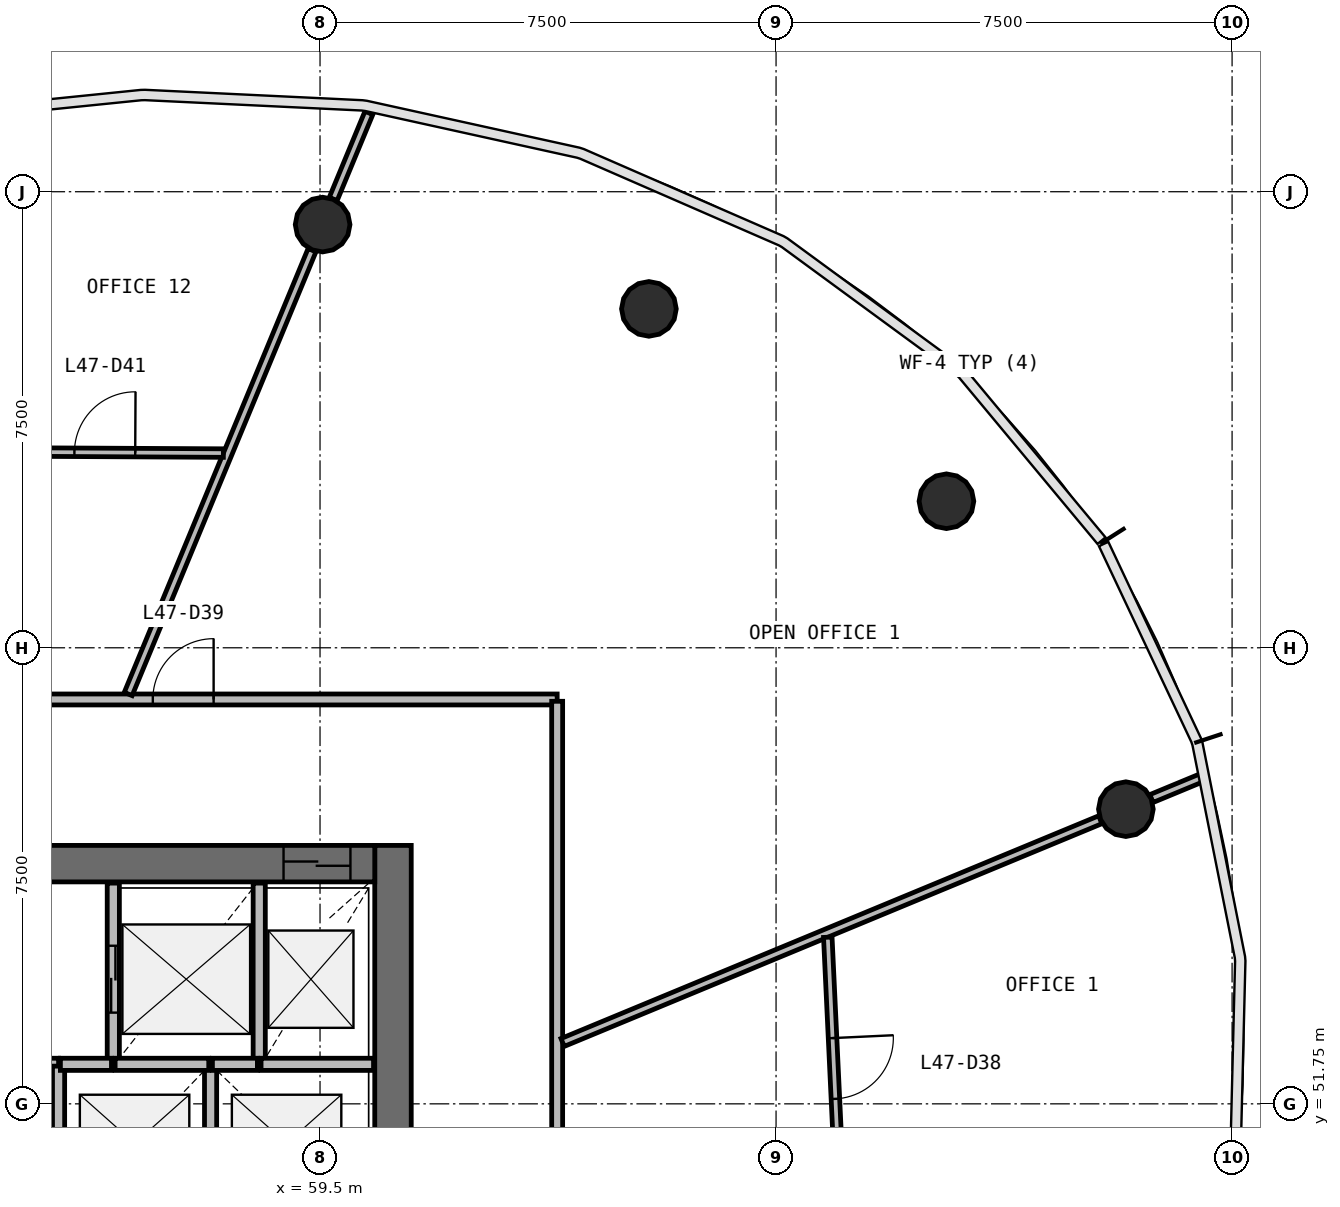
"""IFC4 building model, lengths in metres.
Left out: names, types, materials, properties, quantities, classifications, styles, units other than length and angle.
Written with IfcOpenShell. Run it as: python <this file> out.ifc"""

import sys

from ifc_helpers import new_model, si_unit, direction, frame, frame_2d, origin, origin_2d, place, context, subcontext, project, spatial, rectangle, circle, extrude, source, transform, mapped, element, fill, save


model = new_model("IFC4")
c1 = context("Model", 3, precision=1e-05, world=origin(), true_north=direction((0.0, 1.0)))
c2 = subcontext(c1, "Body", "Model", "MODEL_VIEW")
j1 = project(units=[si_unit("LENGTHUNIT", "METRE"), si_unit("PLANEANGLEUNIT", "RADIAN")], contexts=[c1])
p1 = place(None, origin())
s1 = spatial("IfcSite", under=j1, at=p1, CompositionType="ELEMENT")
p2 = place(p1, origin())
s2 = spatial("IfcBuilding", under=s1, at=p2, CompositionType="ELEMENT")
p3 = place(p2, frame((0.0, 0.0, 195.5)))
s3 = spatial("IfcBuildingStorey", under=s2, at=p3, CompositionType="ELEMENT", Elevation=195.5)
p4 = place(p3, frame((60.7, 40.0, 0.0), z_axis=(0.0, 0.0, 1.0), x_axis=(0.0, 1.0, 0.0)))
e1 = element("IfcWall", 1, at=p4, inside=s3, PredefinedType="SHEAR", context=c2, shape_type="SweptSolid", body=[
    extrude(rectangle(XDim=16.0, YDim=0.6, at=frame_2d((8.0, 0.0))), origin(), (0.0, 0.0, 1.0), 3.9),
])
p5 = place(p4, frame((7.1, 0.0, 0.0)))
e2 = element("IfcOpeningElement", 2, at=p5, cuts=e1, PredefinedType="OPENING", context=c2, shape_type="SweptSolid", body=[
    extrude(rectangle(XDim=1.8, YDim=2.1, at=frame_2d((0.9, 1.05))), frame((0.0, 0.31, 0.0), z_axis=(0.0, -1.0, 0.0), x_axis=(1.0, 0.0, 0.0)), (0.0, 0.0, 1.0), 0.62),
])
p6 = place(p3, frame((60.4, 55.7, 0.0), z_axis=(0.0, 0.0, 1.0), x_axis=(-1.0, 0.0, 0.0)))
e3 = element("IfcWall", 3, at=p6, inside=s3, PredefinedType="SHEAR", context=c2, shape_type="SweptSolid", body=[
    extrude(rectangle(XDim=16.8, YDim=0.6, at=frame_2d((8.4, 0.0))), origin(), (0.0, 0.0, 1.0), 3.9),
])
p7 = place(p6, frame((0.4, 0.0, 0.0)))
e4 = element("IfcOpeningElement", 4, at=p7, cuts=e3, PredefinedType="OPENING", context=c2, shape_type="SweptSolid", body=[
    extrude(rectangle(XDim=1.1, YDim=2.1, at=frame_2d((0.55, 1.05))), frame((0.0, 0.31, 0.0), z_axis=(0.0, -1.0, 0.0), x_axis=(1.0, 0.0, 0.0)), (0.0, 0.0, 1.0), 0.62),
])
p8 = place(p6, frame((10.3, 0.0, 0.0)))
e5 = element("IfcOpeningElement", 5, at=p8, cuts=e3, PredefinedType="OPENING", context=c2, shape_type="SweptSolid", body=[
    extrude(rectangle(XDim=1.2, YDim=2.1, at=frame_2d((0.6, 1.05))), frame((0.0, 0.31, 0.0), z_axis=(0.0, -1.0, 0.0), x_axis=(1.0, 0.0, 0.0)), (0.0, 0.0, 1.0), 0.62),
])
p9 = place(p6, frame((7.25, 0.0, 0.0)))
e6 = element("IfcOpeningElement", 6, at=p9, cuts=e3, PredefinedType="OPENING", context=c2, shape_type="SweptSolid", body=[
    extrude(rectangle(XDim=1.1, YDim=2.1, at=frame_2d((0.55, 1.05))), frame((0.0, 0.31, 0.0), z_axis=(0.0, -1.0, 0.0), x_axis=(1.0, 0.0, 0.0)), (0.0, 0.0, 1.0), 0.62),
])
m1 = source(origin(), c2, "Body", "SweptSolid", [
    extrude(circle(Radius=0.45, at=origin_2d()), origin(), (0.0, 0.0, 1.0), 3.9),
])
for number, where, z_axis, x_axis in (
    (7, (72.753, 56.596, 0.0), (0.0, 0.0, 1.0), (1.0, 0.0, 0.0)),
    (8, (69.802, 61.66, 0.0), (0.0, 0.0, 1.0), (1.0, 0.0, 0.0)),
    (9, (64.909, 64.823, 0.0), (0.0, 0.0, 1.0), (1.0, 0.0, 0.0)),
    (10, (59.543, 66.21, 0.0), (0.0, 0.0, 1.0), (1.0, 0.0, 0.0)),
):
    element("IfcColumn", number, at=place(p3, frame(where, z_axis=z_axis, x_axis=x_axis)), inside=s3, PredefinedType="COLUMN", context=c2, shape_type="MappedRepresentation", body=[
        mapped(m1, transform((0.0, 0.0, 0.0), scale=1.0)),
    ])
p10 = place(p3, frame((56.1, 55.38, 0.0), z_axis=(0.0, 0.0, 1.0), x_axis=(0.0, -1.0, 0.0)))
e11 = element("IfcWall", 11, at=p10, inside=s3, PredefinedType="SOLIDWALL", context=c2, shape_type="SweptSolid", body=[
    extrude(rectangle(XDim=2.98, YDim=0.2, at=frame_2d((1.49, 0.0))), origin(), (0.0, 0.0, 1.0), 3.58),
])
p11 = place(p10, frame((1.03, 0.0, 0.0)))
e12 = element("IfcOpeningElement", 12, at=p11, cuts=e11, PredefinedType="OPENING", context=c2, shape_type="SweptSolid", body=[
    extrude(rectangle(XDim=1.1, YDim=2.1, at=frame_2d((0.55, 1.05))), frame((0.0, 0.11, 0.0), z_axis=(0.0, -1.0, 0.0), x_axis=(1.0, 0.0, 0.0)), (0.0, 0.0, 1.0), 0.22),
])
p12 = place(p3, frame((58.5, 52.4, 0.0), z_axis=(0.0, 0.0, 1.0), x_axis=(0.0, 1.0, 0.0)))
e13 = element("IfcWall", 13, at=p12, inside=s3, PredefinedType="SOLIDWALL", context=c2, shape_type="SweptSolid", body=[
    extrude(rectangle(XDim=2.98, YDim=0.2, at=frame_2d((1.49, 0.0))), origin(), (0.0, 0.0, 1.0), 3.58),
])
p13 = place(p3, frame((55.2, 52.4, 0.0), z_axis=(0.0, 0.0, 1.0), x_axis=(-1.0, 0.0, 0.0)))
e14 = element("IfcWall", 14, at=p13, inside=s3, PredefinedType="SOLIDWALL", context=c2, shape_type="SweptSolid", body=[
    extrude(rectangle(XDim=2.5, YDim=0.2, at=frame_2d((1.25, 0.0))), origin(), (0.0, 0.0, 1.0), 3.58),
])
p14 = place(p3, frame((55.2, 50.01, 0.0), z_axis=(0.0, 0.0, 1.0), x_axis=(0.0, 1.0, 0.0)))
e15 = element("IfcWall", 15, at=p14, inside=s3, PredefinedType="SOLIDWALL", context=c2, shape_type="SweptSolid", body=[
    extrude(rectangle(XDim=2.36, YDim=0.2, at=frame_2d((1.18, 0.0))), origin(), (0.0, 0.0, 1.0), 3.58),
])
p15 = place(p3, frame((57.7, 50.01, 0.0), z_axis=(0.0, 0.0, 1.0), x_axis=(0.0, 1.0, 0.0)))
e16 = element("IfcWall", 16, at=p15, inside=s3, PredefinedType="SOLIDWALL", context=c2, shape_type="SweptSolid", body=[
    extrude(rectangle(XDim=2.39, YDim=0.2, at=frame_2d((1.195, 0.0))), origin(), (0.0, 0.0, 1.0), 3.58),
])
p16 = place(p3, frame((60.38, 52.4, 0.0), z_axis=(0.0, 0.0, 1.0), x_axis=(-1.0, 0.0, 0.0)))
e17 = element("IfcWall", 17, at=p16, inside=s3, PredefinedType="SOLIDWALL", context=c2, shape_type="SweptSolid", body=[
    extrude(rectangle(XDim=1.85, YDim=0.2, at=frame_2d((0.925, 0.0))), origin(), (0.0, 0.0, 1.0), 3.58),
])
p17 = place(p3, frame((57.67, 52.4, 0.0), z_axis=(0.0, 0.0, 1.0), x_axis=(-1.0, 0.0, 0.0)))
e18 = element("IfcWall", 18, at=p17, inside=s3, PredefinedType="SOLIDWALL", context=c2, shape_type="SweptSolid", body=[
    extrude(rectangle(XDim=1.54, YDim=0.2, at=frame_2d((0.77, 0.0))), origin(), (0.0, 0.0, 1.0), 3.58),
])
p18 = place(p3, frame((56.07, 52.4, 0.0), z_axis=(0.0, 0.0, 1.0), x_axis=(-1.0, 0.0, 0.0)))
e19 = element("IfcWall", 19, at=p18, inside=s3, PredefinedType="SOLIDWALL", context=c2, shape_type="SweptSolid", body=[
    extrude(rectangle(XDim=0.84, YDim=0.2, at=frame_2d((0.42, 0.0))), origin(), (0.0, 0.0, 1.0), 3.58),
])
p19 = place(p3, frame((58.47, 52.4, 0.0), z_axis=(0.0, 0.0, 1.0), x_axis=(-1.0, 0.0, 0.0)))
e20 = element("IfcWall", 20, at=p19, inside=s3, PredefinedType="SOLIDWALL", context=c2, shape_type="SweptSolid", body=[
    extrude(rectangle(XDim=0.74, YDim=0.2, at=frame_2d((0.37, 0.0))), origin(), (0.0, 0.0, 1.0), 3.58),
])
p20 = place(p3, frame((40.6, 58.4, 0.0), z_axis=(0.0, 0.0, 1.0), x_axis=(1.0, 0.0, 0.0)))
e21 = element("IfcWall", 21, at=p20, inside=s3, PredefinedType="PARTITIONING", context=c2, shape_type="SweptSolid", body=[
    extrude(rectangle(XDim=22.8, YDim=0.18, at=frame_2d((11.4, 0.0))), origin(), (0.0, 0.0, 1.0), 2.88),
])
p21 = place(p20, frame((16.15, 0.0, 0.0)))
e22 = element("IfcOpeningElement", 22, at=p21, cuts=e21, PredefinedType="OPENING", context=c2, shape_type="SweptSolid", body=[
    extrude(rectangle(XDim=1.0, YDim=2.1, at=frame_2d((0.5, 1.05))), frame((0.0, 0.1, 0.0), z_axis=(0.0, -1.0, 0.0), x_axis=(1.0, 0.0, 0.0)), (0.0, 0.0, 1.0), 0.2),
])
p22 = place(p20, frame((10.95, 0.0, 0.0)))
e23 = element("IfcOpeningElement", 23, at=p22, cuts=e21, PredefinedType="OPENING", context=c2, shape_type="SweptSolid", body=[
    extrude(rectangle(XDim=1.0, YDim=2.1, at=frame_2d((0.5, 1.05))), frame((0.0, 0.1, 0.0), z_axis=(0.0, -1.0, 0.0), x_axis=(1.0, 0.0, 0.0)), (0.0, 0.0, 1.0), 0.2),
])
p23 = place(p3, frame((63.4, 58.37, 0.0), z_axis=(0.0, 0.0, 1.0), x_axis=(0.0, -1.0, 0.0)))
e24 = element("IfcWall", 24, at=p23, inside=s3, PredefinedType="PARTITIONING", context=c2, shape_type="SweptSolid", body=[
    extrude(rectangle(XDim=20.74, YDim=0.18, at=frame_2d((10.37, 0.0))), origin(), (0.0, 0.0, 1.0), 2.88),
])
p24 = place(p23, frame((9.89, 0.0, 0.0)))
e25 = element("IfcOpeningElement", 25, at=p24, cuts=e24, PredefinedType="OPENING", context=c2, shape_type="SweptSolid", body=[
    extrude(rectangle(XDim=1.0, YDim=2.1, at=frame_2d((0.5, 1.05))), frame((0.0, 0.1, 0.0), z_axis=(0.0, -1.0, 0.0), x_axis=(1.0, 0.0, 0.0)), (0.0, 0.0, 1.0), 0.2),
])
p25 = place(p3, frame((72.333, 56.422, 0.0), z_axis=(0.0, 0.0, 1.0), x_axis=(-0.923877866197, -0.382687455178, 0.0)))
e26 = element("IfcWall", 26, at=p25, inside=s3, PredefinedType="PARTITIONING", context=c2, shape_type="SweptSolid", body=[
    extrude(rectangle(XDim=9.571, YDim=0.14, at=frame_2d((4.786, 0.0))), origin(), (0.0, 0.0, 1.0), 2.88),
])
p26 = place(p3, frame((59.369, 65.789, 0.0), z_axis=(0.0, 0.0, 1.0), x_axis=(-0.382679289053, -0.923881248716, 0.0)))
e27 = element("IfcWall", 27, at=p26, inside=s3, PredefinedType="PARTITIONING", context=c2, shape_type="SweptSolid", body=[
    extrude(rectangle(XDim=7.901, YDim=0.14, at=frame_2d((3.95, 0.0))), origin(), (0.0, 0.0, 1.0), 2.88),
])
p27 = place(p3, frame((67.851, 54.49, 0.0), z_axis=(0.0, 0.0, 1.0), x_axis=(0.047064643858, -0.998891845646, 0.0)))
e28 = element("IfcWall", 28, at=p27, inside=s3, PredefinedType="PARTITIONING", context=c2, shape_type="SweptSolid", body=[
    extrude(rectangle(XDim=4.311, YDim=0.14, at=frame_2d((2.155, 0.0))), origin(), (0.0, 0.0, 1.0), 2.88),
])
p28 = place(p27, frame((1.66, 0.0, 0.0)))
e29 = element("IfcOpeningElement", 29, at=p28, cuts=e28, PredefinedType="OPENING", context=c2, shape_type="SweptSolid", body=[
    extrude(rectangle(XDim=1.0, YDim=2.1, at=frame_2d((0.5, 1.05))), frame((0.0, 0.08, 0.0), z_axis=(0.0, -1.0, 0.0), x_axis=(1.0, 0.0, 0.0)), (0.0, 0.0, 1.0), 0.16),
])
p29 = place(p3, frame((53.906, 62.473, 0.0), z_axis=(0.0, 0.0, 1.0), x_axis=(0.999985936292, -0.005303509904, 0.0)))
e30 = element("IfcWall", 30, at=p29, inside=s3, PredefinedType="PARTITIONING", context=c2, shape_type="SweptSolid", body=[
    extrude(rectangle(XDim=4.005, YDim=0.14, at=frame_2d((2.002, 0.0))), origin(), (0.0, 0.0, 1.0), 2.88),
])
p30 = place(p29, frame((1.555, 0.0, 0.0)))
e31 = element("IfcOpeningElement", 31, at=p30, cuts=e30, PredefinedType="OPENING", context=c2, shape_type="SweptSolid", body=[
    extrude(rectangle(XDim=1.0, YDim=2.1, at=frame_2d((0.5, 1.05))), frame((0.0, 0.08, 0.0), z_axis=(0.0, -1.0, 0.0), x_axis=(1.0, 0.0, 0.0)), (0.0, 0.0, 1.0), 0.16),
])
p31 = place(p3, frame((59.717, 66.63, 0.0), z_axis=(0.0, 0.0, 1.0), x_axis=(0.382783039517, 0.923838267587, 0.0)))
e32 = element("IfcWall", 32, at=p31, inside=s3, PredefinedType="PARTITIONING", context=c2, shape_type="SweptSolid", body=[
    extrude(rectangle(XDim=1.533, YDim=0.14, at=frame_2d((0.767, 0.0))), origin(), (0.0, 0.0, 1.0), 2.88),
])
p32 = place(p3, frame((73.174, 56.77, 0.0), z_axis=(0.0, 0.0, 1.0), x_axis=(0.923828017367, 0.382807777256, 0.0)))
e33 = element("IfcWall", 33, at=p32, inside=s3, PredefinedType="PARTITIONING", context=c2, shape_type="SweptSolid", body=[
    extrude(rectangle(XDim=0.883, YDim=0.14, at=frame_2d((0.441, 0.0))), origin(), (0.0, 0.0, 1.0), 2.88),
])
m2 = source(origin(), c2, "Body", "SweptSolid", [
    extrude(rectangle(XDim=1.1, YDim=2.1, at=frame_2d((0.55, 1.05))), frame((0.0, 0.025, 0.0), z_axis=(0.0, -1.0, 0.0), x_axis=(1.0, 0.0, 0.0)), (0.0, 0.0, 1.0), 0.05),
])
p33 = place(p11, origin())
e34 = element("IfcDoor", 34, at=p33, inside=s3, OperationType="DOUBLE_DOOR_SLIDING", PredefinedType="USERDEFINED", context=c2, shape_type="MappedRepresentation", body=[
    mapped(m2, transform((0.0, 0.0, 0.0), scale=1.0)),
])
fill(e12, e34)
p34 = place(p7, origin())
e35 = element("IfcDoor", 35, at=p34, inside=s3, OperationType="DOUBLE_DOOR_SLIDING", PredefinedType="USERDEFINED", context=c2, shape_type="MappedRepresentation", body=[
    mapped(m2, transform((0.0, 0.0, 0.0), scale=1.0)),
])
fill(e4, e35)
m3 = source(origin(), c2, "Body", "SweptSolid", [
    extrude(rectangle(XDim=1.0, YDim=2.1, at=frame_2d((0.5, 1.05))), frame((0.0, 0.025, 0.0), z_axis=(0.0, -1.0, 0.0), x_axis=(1.0, 0.0, 0.0)), (0.0, 0.0, 1.0), 0.05),
])
p35 = place(p28, origin())
e36 = element("IfcDoor", 36, at=p35, inside=s3, OperationType="SINGLE_SWING_LEFT", PredefinedType="DOOR", context=c2, shape_type="MappedRepresentation", body=[
    mapped(m3, transform((0.0, 0.0, 0.0), scale=1.0)),
])
fill(e29, e36)
p36 = place(p21, origin())
e37 = element("IfcDoor", 37, at=p36, inside=s3, OperationType="SINGLE_SWING_RIGHT", PredefinedType="DOOR", context=c2, shape_type="MappedRepresentation", body=[
    mapped(m3, transform((0.0, 0.0, 0.0), scale=1.0)),
])
fill(e22, e37)
p37 = place(p30, origin())
e38 = element("IfcDoor", 38, at=p37, inside=s3, OperationType="SINGLE_SWING_RIGHT", PredefinedType="DOOR", context=c2, shape_type="MappedRepresentation", body=[
    mapped(m3, transform((0.0, 0.0, 0.0), scale=1.0)),
])
fill(e31, e38)
save(model, sys.argv[1])
